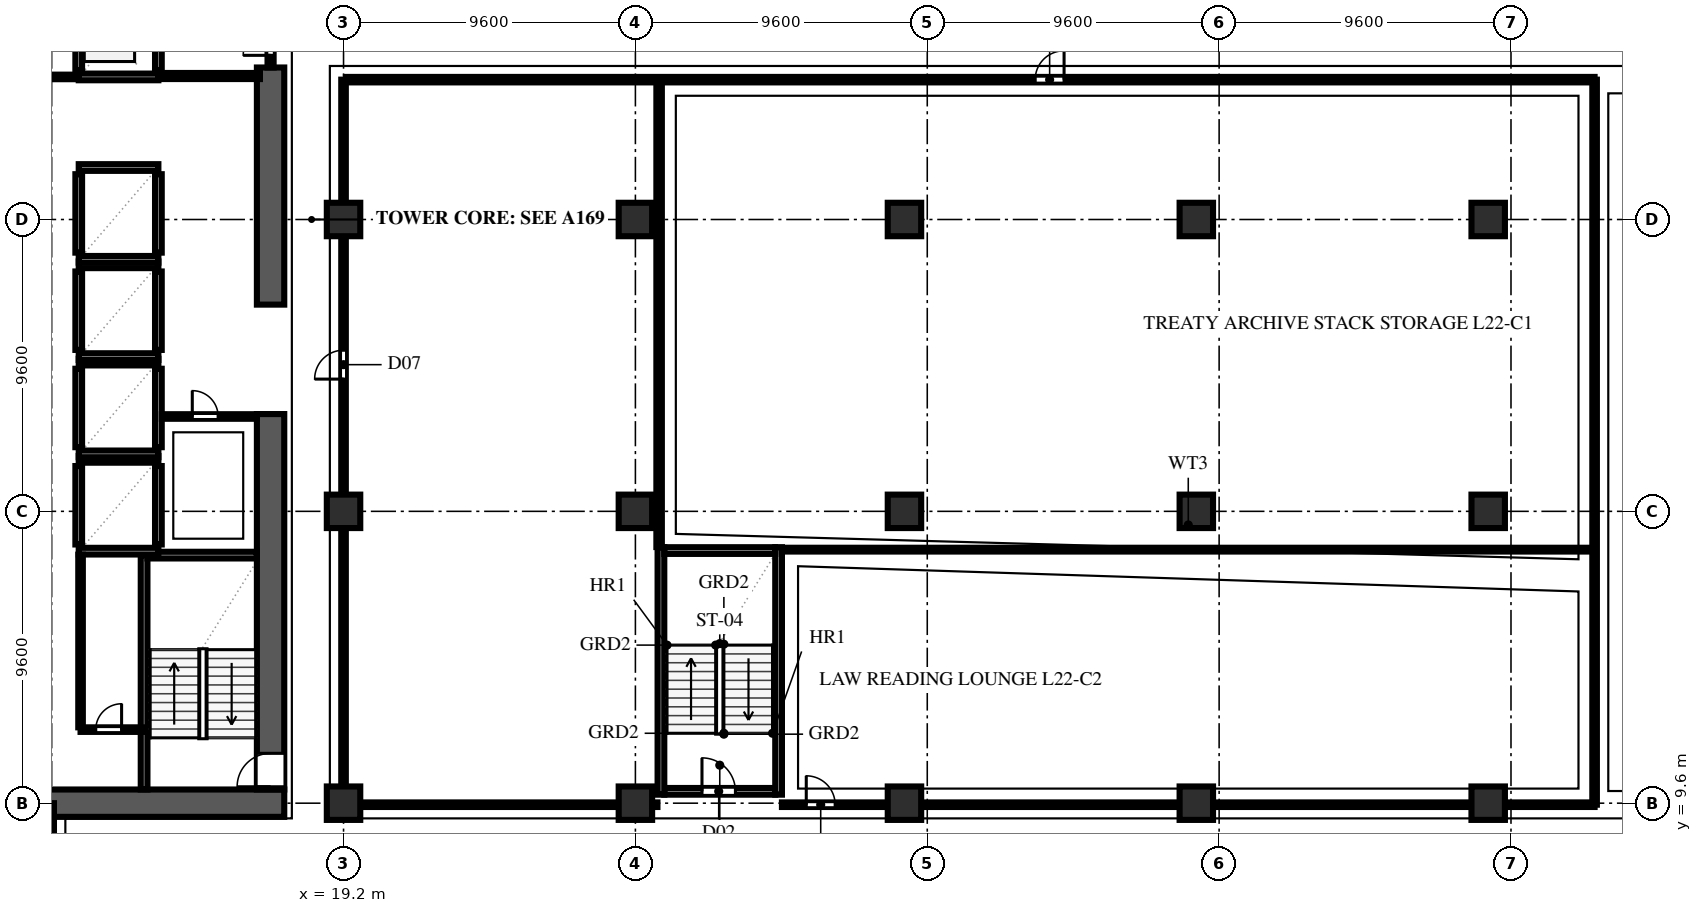
"""IFC4 building model, lengths in metres.
Left out: names, types, materials, properties, quantities, classifications, styles, units other than length and angle.
Written with IfcOpenShell. Run it as: python <this file> out.ifc"""

import sys

from ifc_helpers import new_model, si_unit, direction, frame, frame_2d, origin, origin_2d, place, context, subcontext, project, spatial, rectangle, extrude, element, fill, save


model = new_model("IFC4")
c1 = context("Model", 3, precision=1e-05, world=origin(), true_north=direction((0.0, 1.0)))
c2 = subcontext(c1, "Body", "Model", "MODEL_VIEW")
j1 = project(units=[si_unit("LENGTHUNIT", "METRE"), si_unit("PLANEANGLEUNIT", "RADIAN")], contexts=[c1])
p1 = place(None, origin())
s1 = spatial("IfcSite", under=j1, at=p1, CompositionType="ELEMENT")
p2 = place(p1, origin())
s2 = spatial("IfcBuilding", under=s1, at=p2, CompositionType="ELEMENT")
p3 = place(p2, frame((0.0, 0.0, 88.8)))
s3 = spatial("IfcBuildingStorey", under=s2, at=p3, CompositionType="ELEMENT", Elevation=88.8)
p4 = place(p3, frame((2.65, 9.6, 0.0), z_axis=(0.0, 0.0, 1.0), x_axis=(1.0, 0.0, 0.0)))
e1 = element("IfcWall", 1, at=p4, inside=s3, PredefinedType="SHEAR", context=c2, shape_type="SweptSolid", body=[
    extrude(rectangle(XDim=14.6, YDim=0.9, at=frame_2d((7.3, 0.0))), origin(), (0.0, 0.0, 1.0), 3.54),
])
p5 = place(p3, frame((16.8, 10.05, 0.0), z_axis=(0.0, 0.0, 1.0), x_axis=(0.0, 1.0, 0.0)))
e2 = element("IfcWall", 2, at=p5, inside=s3, PredefinedType="SHEAR", context=c2, shape_type="SweptSolid", body=[
    extrude(rectangle(XDim=12.35, YDim=0.9, at=frame_2d((6.175, 0.0))), origin(), (0.0, 0.0, 1.0), 3.54),
])
p6 = place(p5, frame((0.09, 0.0, 0.0)))
e3 = element("IfcOpeningElement", 3, at=p6, cuts=e2, PredefinedType="OPENING", context=c2, shape_type="SweptSolid", body=[
    extrude(rectangle(XDim=1.1, YDim=2.2, at=frame_2d((0.55, 1.1))), frame((0.0, 0.462, 0.0), z_axis=(0.0, -1.0, 0.0), x_axis=(1.0, 0.0, 0.0)), (0.0, 0.0, 1.0), 0.924),
])
p7 = place(p3, frame((16.8, 26.0, 0.0), z_axis=(0.0, 0.0, 1.0), x_axis=(0.0, 1.0, 0.0)))
e4 = element("IfcWall", 4, at=p7, inside=s3, PredefinedType="SHEAR", context=c2, shape_type="SweptSolid", body=[
    extrude(rectangle(XDim=7.8, YDim=0.9, at=frame_2d((3.9, 0.0))), origin(), (0.0, 0.0, 1.0), 3.54),
])
for number, where, z_axis, x_axis in (
    (5, (19.2, 9.6, 0.0), (0.0, 0.0, 1.0), (1.0, 0.0, 0.0)),
    (6, (19.2, 19.2, 0.0), (0.0, 0.0, 1.0), (1.0, 0.0, 0.0)),
    (7, (19.2, 28.8, 0.0), (0.0, 0.0, 1.0), (1.0, 0.0, 0.0)),
    (8, (28.8, 9.6, 0.0), (0.0, 0.0, 1.0), (1.0, 0.0, 0.0)),
    (9, (28.8, 19.2, 0.0), (0.0, 0.0, 1.0), (1.0, 0.0, 0.0)),
    (10, (28.8, 28.8, 0.0), (0.0, 0.0, 1.0), (1.0, 0.0, 0.0)),
    (11, (37.65, 9.6, 0.0), (0.0, 0.0, 1.0), (1.0, 0.0, 0.0)),
    (12, (37.65, 19.2, 0.0), (0.0, 0.0, 1.0), (1.0, 0.0, 0.0)),
    (13, (37.65, 28.8, 0.0), (0.0, 0.0, 1.0), (1.0, 0.0, 0.0)),
    (14, (47.25, 9.6, 0.0), (0.0, 0.0, 1.0), (1.0, 0.0, 0.0)),
    (15, (47.25, 19.2, 0.0), (0.0, 0.0, 1.0), (1.0, 0.0, 0.0)),
    (16, (47.25, 28.8, 0.0), (0.0, 0.0, 1.0), (1.0, 0.0, 0.0)),
    (17, (56.85, 9.6, 0.0), (0.0, 0.0, 1.0), (1.0, 0.0, 0.0)),
    (18, (56.85, 19.2, 0.0), (0.0, 0.0, 1.0), (1.0, 0.0, 0.0)),
    (19, (56.85, 28.8, 0.0), (0.0, 0.0, 1.0), (1.0, 0.0, 0.0)),
):
    element("IfcColumn", number, at=place(p3, frame(where, z_axis=z_axis, x_axis=x_axis)), inside=s3, PredefinedType="COLUMN", context=c2, shape_type="SweptSolid", body=[
        extrude(rectangle(XDim=1.1, YDim=1.1, at=origin_2d()), origin(), (0.0, 0.0, 1.0), 3.8),
    ])
p8 = place(p3, frame((12.64, 10.05, 0.0), z_axis=(0.0, 0.0, 1.0), x_axis=(0.0, 1.0, 0.0)))
e20 = element("IfcWall", 20, at=p8, inside=s3, PredefinedType="SOLIDWALL", context=c2, shape_type="SweptSolid", body=[
    extrude(rectangle(XDim=7.71, YDim=0.22, at=frame_2d((3.855, 0.0))), origin(), (0.0, 0.0, 1.0), 3.54),
])
p9 = place(p3, frame((12.75, 17.76, 0.0), z_axis=(0.0, 0.0, 1.0), x_axis=(1.0, 0.0, 0.0)))
e21 = element("IfcWall", 21, at=p9, inside=s3, PredefinedType="SOLIDWALL", context=c2, shape_type="SweptSolid", body=[
    extrude(rectangle(XDim=3.6, YDim=0.22, at=frame_2d((1.8, 0.0))), origin(), (0.0, 0.0, 1.0), 3.54),
])
p10 = place(p3, frame((29.75, 9.99, 0.0), z_axis=(0.0, 0.0, 1.0), x_axis=(1.0, 0.0, 0.0)))
e22 = element("IfcWall", 22, at=p10, inside=s3, PredefinedType="SOLIDWALL", context=c2, shape_type="SweptSolid", body=[
    extrude(rectangle(XDim=3.65, YDim=0.22, at=frame_2d((1.825, 0.0))), origin(), (0.0, 0.0, 1.0), 3.54),
])
p11 = place(p10, frame((1.24, 0.0, 0.0)))
e23 = element("IfcOpeningElement", 23, at=p11, cuts=e22, PredefinedType="OPENING", context=c2, shape_type="SweptSolid", body=[
    extrude(rectangle(XDim=1.1, YDim=2.2, at=frame_2d((0.55, 1.1))), frame((0.0, 0.122, 0.0), z_axis=(0.0, -1.0, 0.0), x_axis=(1.0, 0.0, 0.0)), (0.0, 0.0, 1.0), 0.244),
])
for number, where, z_axis, x_axis in (
    (24, (29.64, 9.88, 0.0), (0.0, 0.0, 1.0), (0.0, 1.0, 0.0)),
    (25, (33.51, 9.88, 0.0), (0.0, 0.0, 1.0), (0.0, 1.0, 0.0)),
):
    element("IfcWall", number, at=place(p3, frame(where, z_axis=z_axis, x_axis=x_axis)), inside=s3, PredefinedType="SOLIDWALL", context=c2, shape_type="SweptSolid", body=[
        extrude(rectangle(XDim=8.14, YDim=0.22, at=frame_2d((4.07, 0.0))), origin(), (0.0, 0.0, 1.0), 3.54),
    ])
p12 = place(p3, frame((29.75, 17.91, 0.0), z_axis=(0.0, 0.0, 1.0), x_axis=(1.0, 0.0, 0.0)))
e26 = element("IfcWall", 26, at=p12, inside=s3, PredefinedType="SOLIDWALL", context=c2, shape_type="SweptSolid", body=[
    extrude(rectangle(XDim=3.65, YDim=0.22, at=frame_2d((1.825, 0.0))), origin(), (0.0, 0.0, 1.0), 3.54),
])
for number, where, z_axis, x_axis in (
    (27, (10.49, 18.11, 0.0), (0.0, 0.0, 1.0), (0.0, 1.0, 0.0)),
    (28, (13.11, 18.11, 0.0), (0.0, 0.0, 1.0), (0.0, 1.0, 0.0)),
):
    element("IfcWall", number, at=place(p3, frame(where, z_axis=z_axis, x_axis=x_axis)), inside=s3, PredefinedType="SOLIDWALL", context=c2, shape_type="SweptSolid", body=[
        extrude(rectangle(XDim=2.58, YDim=0.22, at=frame_2d((1.29, 0.0))), origin(), (0.0, 0.0, 1.0), 3.54),
    ])
for number, where, z_axis, x_axis in (
    (29, (10.49, 17.89, 0.0), (0.0, 0.0, 1.0), (1.0, 0.0, 0.0)),
    (30, (10.49, 20.91, 0.0), (0.0, 0.0, 1.0), (1.0, 0.0, 0.0)),
):
    element("IfcWall", number, at=place(p3, frame(where, z_axis=z_axis, x_axis=x_axis)), inside=s3, PredefinedType="SOLIDWALL", context=c2, shape_type="SweptSolid", body=[
        extrude(rectangle(XDim=2.62, YDim=0.22, at=frame_2d((1.31, 0.0))), origin(), (0.0, 0.0, 1.0), 3.54),
    ])
for number, where, z_axis, x_axis in (
    (31, (10.49, 21.31, 0.0), (0.0, 0.0, 1.0), (0.0, 1.0, 0.0)),
    (32, (13.11, 21.31, 0.0), (0.0, 0.0, 1.0), (0.0, 1.0, 0.0)),
):
    element("IfcWall", number, at=place(p3, frame(where, z_axis=z_axis, x_axis=x_axis)), inside=s3, PredefinedType="SOLIDWALL", context=c2, shape_type="SweptSolid", body=[
        extrude(rectangle(XDim=2.58, YDim=0.22, at=frame_2d((1.29, 0.0))), origin(), (0.0, 0.0, 1.0), 3.54),
    ])
for number, where, z_axis, x_axis in (
    (33, (10.49, 21.09, 0.0), (0.0, 0.0, 1.0), (1.0, 0.0, 0.0)),
    (34, (10.49, 24.11, 0.0), (0.0, 0.0, 1.0), (1.0, 0.0, 0.0)),
):
    element("IfcWall", number, at=place(p3, frame(where, z_axis=z_axis, x_axis=x_axis)), inside=s3, PredefinedType="SOLIDWALL", context=c2, shape_type="SweptSolid", body=[
        extrude(rectangle(XDim=2.62, YDim=0.22, at=frame_2d((1.31, 0.0))), origin(), (0.0, 0.0, 1.0), 3.54),
    ])
for number, where, z_axis, x_axis in (
    (35, (10.49, 24.51, 0.0), (0.0, 0.0, 1.0), (0.0, 1.0, 0.0)),
    (36, (13.11, 24.51, 0.0), (0.0, 0.0, 1.0), (0.0, 1.0, 0.0)),
):
    element("IfcWall", number, at=place(p3, frame(where, z_axis=z_axis, x_axis=x_axis)), inside=s3, PredefinedType="SOLIDWALL", context=c2, shape_type="SweptSolid", body=[
        extrude(rectangle(XDim=2.58, YDim=0.22, at=frame_2d((1.29, 0.0))), origin(), (0.0, 0.0, 1.0), 3.54),
    ])
for number, where, z_axis, x_axis in (
    (37, (10.49, 24.29, 0.0), (0.0, 0.0, 1.0), (1.0, 0.0, 0.0)),
    (38, (10.49, 27.31, 0.0), (0.0, 0.0, 1.0), (1.0, 0.0, 0.0)),
):
    element("IfcWall", number, at=place(p3, frame(where, z_axis=z_axis, x_axis=x_axis)), inside=s3, PredefinedType="SOLIDWALL", context=c2, shape_type="SweptSolid", body=[
        extrude(rectangle(XDim=2.62, YDim=0.22, at=frame_2d((1.31, 0.0))), origin(), (0.0, 0.0, 1.0), 3.54),
    ])
for number, where, z_axis, x_axis in (
    (39, (10.49, 27.71, 0.0), (0.0, 0.0, 1.0), (0.0, 1.0, 0.0)),
    (40, (13.11, 27.71, 0.0), (0.0, 0.0, 1.0), (0.0, 1.0, 0.0)),
):
    element("IfcWall", number, at=place(p3, frame(where, z_axis=z_axis, x_axis=x_axis)), inside=s3, PredefinedType="SOLIDWALL", context=c2, shape_type="SweptSolid", body=[
        extrude(rectangle(XDim=2.58, YDim=0.22, at=frame_2d((1.29, 0.0))), origin(), (0.0, 0.0, 1.0), 3.54),
    ])
for number, where, z_axis, x_axis in (
    (41, (10.49, 27.49, 0.0), (0.0, 0.0, 1.0), (1.0, 0.0, 0.0)),
    (42, (10.49, 30.51, 0.0), (0.0, 0.0, 1.0), (1.0, 0.0, 0.0)),
):
    element("IfcWall", number, at=place(p3, frame(where, z_axis=z_axis, x_axis=x_axis)), inside=s3, PredefinedType="SOLIDWALL", context=c2, shape_type="SweptSolid", body=[
        extrude(rectangle(XDim=2.62, YDim=0.22, at=frame_2d((1.31, 0.0))), origin(), (0.0, 0.0, 1.0), 3.54),
    ])
for number, where, z_axis, x_axis in (
    (43, (10.49, 33.71, 0.0), (0.0, 0.0, 1.0), (0.0, 1.0, 0.0)),
    (44, (13.11, 33.71, 0.0), (0.0, 0.0, 1.0), (0.0, 1.0, 0.0)),
):
    element("IfcWall", number, at=place(p3, frame(where, z_axis=z_axis, x_axis=x_axis)), inside=s3, PredefinedType="SOLIDWALL", context=c2, shape_type="SweptSolid", body=[
        extrude(rectangle(XDim=2.78, YDim=0.22, at=frame_2d((1.39, 0.0))), origin(), (0.0, 0.0, 1.0), 3.54),
    ])
p13 = place(p3, frame((10.49, 33.49, 0.0), z_axis=(0.0, 0.0, 1.0), x_axis=(1.0, 0.0, 0.0)))
e45 = element("IfcWall", 45, at=p13, inside=s3, PredefinedType="SOLIDWALL", context=c2, shape_type="SweptSolid", body=[
    extrude(rectangle(XDim=2.62, YDim=0.22, at=frame_2d((1.31, 0.0))), origin(), (0.0, 0.0, 1.0), 3.54),
])
p14 = place(p3, frame((13.12, 33.52, 0.0), z_axis=(0.0, 0.0, 1.0), x_axis=(1.0, 0.0, 0.0)))
e46 = element("IfcWall", 46, at=p14, inside=s3, PredefinedType="SOLIDWALL", context=c2, shape_type="SweptSolid", body=[
    extrude(rectangle(XDim=3.33, YDim=0.2, at=frame_2d((1.665, 0.0))), origin(), (0.0, 0.0, 1.0), 3.54),
])
p15 = place(p3, frame((16.8, 33.8, 0.0), z_axis=(0.0, 0.0, 1.0), x_axis=(0.0, 1.0, 0.0)))
e47 = element("IfcWall", 47, at=p15, inside=s3, PredefinedType="SOLIDWALL", context=c2, shape_type="SweptSolid", body=[
    extrude(rectangle(XDim=2.6, YDim=0.2, at=frame_2d((1.3, 0.0))), origin(), (0.0, 0.0, 1.0), 3.54),
])
p16 = place(p15, frame((0.4, 0.0, 0.0)))
e48 = element("IfcOpeningElement", 48, at=p16, cuts=e47, PredefinedType="OPENING", context=c2, shape_type="SweptSolid", body=[
    extrude(rectangle(XDim=1.8, YDim=2.2, at=frame_2d((0.9, 1.1))), frame((0.0, 0.112, 0.0), z_axis=(0.0, -1.0, 0.0), x_axis=(1.0, 0.0, 0.0)), (0.0, 0.0, 1.0), 0.224),
])
p17 = place(p3, frame((8.965, 33.49, 0.0), z_axis=(0.0, 0.0, 1.0), x_axis=(1.0, 0.0, 0.0)))
e49 = element("IfcWall", 49, at=p17, inside=s3, PredefinedType="PARTITIONING", context=c2, shape_type="SweptSolid", body=[
    extrude(rectangle(XDim=1.52, YDim=0.15, at=frame_2d((0.76, 0.0))), origin(), (0.0, 0.0, 1.0), 3.54),
])
p18 = place(p3, frame((10.55, 12.02, 0.0), z_axis=(0.0, 0.0, 1.0), x_axis=(1.0, 0.0, 0.0)))
e50 = element("IfcWall", 50, at=p18, inside=s3, PredefinedType="PARTITIONING", context=c2, shape_type="SweptSolid", body=[
    extrude(rectangle(XDim=2.08, YDim=0.15, at=frame_2d((1.04, 0.0))), origin(), (0.0, 0.0, 1.0), 3.54),
])
p19 = place(p18, frame((0.5, 0.0, 0.0)))
e51 = element("IfcOpeningElement", 51, at=p19, cuts=e50, PredefinedType="OPENING", context=c2, shape_type="SweptSolid", body=[
    extrude(rectangle(XDim=0.85, YDim=2.1, at=frame_2d((0.425, 1.05))), frame((0.0, 0.087, 0.0), z_axis=(0.0, -1.0, 0.0), x_axis=(1.0, 0.0, 0.0)), (0.0, 0.0, 1.0), 0.174),
])
p20 = place(p3, frame((10.55, 12.095, 0.0), z_axis=(0.0, 0.0, 1.0), x_axis=(0.0, 1.0, 0.0)))
e52 = element("IfcWall", 52, at=p20, inside=s3, PredefinedType="PARTITIONING", context=c2, shape_type="SweptSolid", body=[
    extrude(rectangle(XDim=5.68, YDim=0.15, at=frame_2d((2.84, 0.0))), origin(), (0.0, 0.0, 1.0), 3.54),
])
p21 = place(p3, frame((13.225, 22.32, 0.0), z_axis=(0.0, 0.0, 1.0), x_axis=(1.0, 0.0, 0.0)))
e53 = element("IfcWall", 53, at=p21, inside=s3, PredefinedType="PARTITIONING", context=c2, shape_type="SweptSolid", body=[
    extrude(rectangle(XDim=3.12, YDim=0.15, at=frame_2d((1.56, 0.0))), origin(), (0.0, 0.0, 1.0), 3.54),
])
p22 = place(p21, frame((1.0, 0.0, 0.0)))
e54 = element("IfcOpeningElement", 54, at=p22, cuts=e53, PredefinedType="OPENING", context=c2, shape_type="SweptSolid", body=[
    extrude(rectangle(XDim=0.85, YDim=2.1, at=frame_2d((0.425, 1.05))), frame((0.0, 0.087, 0.0), z_axis=(0.0, -1.0, 0.0), x_axis=(1.0, 0.0, 0.0)), (0.0, 0.0, 1.0), 0.174),
])
p23 = place(p3, frame((9.6, 7.5, 0.0), z_axis=(0.0, 0.0, 1.0), x_axis=(0.0, 1.0, 0.0)))
e55 = element("IfcWall", 55, at=p23, inside=s3, PredefinedType="PARTITIONING", context=c2, shape_type="SweptSolid", body=[
    extrude(rectangle(XDim=2.1, YDim=0.15, at=frame_2d((1.05, 0.0))), origin(), (0.0, 0.0, 1.0), 2.924),
])
p24 = place(p3, frame((19.2, 9.55, 0.0), z_axis=(0.0, 0.0, 1.0), x_axis=(0.0, 1.0, 0.0)))
e56 = element("IfcWall", 56, at=p24, inside=s3, PredefinedType="PARTITIONING", context=c2, shape_type="SweptSolid", body=[
    extrude(rectangle(XDim=23.85, YDim=0.15, at=frame_2d((11.925, 0.0))), origin(), (0.0, 0.0, 1.0), 2.924),
])
p25 = place(p24, frame((14.0, 0.0, 0.0)))
e57 = element("IfcOpeningElement", 57, at=p25, cuts=e56, PredefinedType="OPENING", context=c2, shape_type="SweptSolid", body=[
    extrude(rectangle(XDim=0.95, YDim=2.15, at=frame_2d((0.475, 1.075))), frame((0.0, 0.087, 0.0), z_axis=(0.0, -1.0, 0.0), x_axis=(1.0, 0.0, 0.0)), (0.0, 0.0, 1.0), 0.174),
])
p26 = place(p3, frame((29.58, 18.025, 0.0), z_axis=(0.0, 0.0, 1.0), x_axis=(0.0, 1.0, 0.0)))
e58 = element("IfcWall", 58, at=p26, inside=s3, PredefinedType="PARTITIONING", context=c2, shape_type="SweptSolid", body=[
    extrude(rectangle(XDim=15.28, YDim=0.18, at=frame_2d((7.64, 0.0))), origin(), (0.0, 0.0, 1.0), 3.54),
])
p27 = place(p3, frame((19.28, 33.4, 0.0), z_axis=(0.0, 0.0, 1.0), x_axis=(1.0, 0.0, 0.0)))
e59 = element("IfcWall", 59, at=p27, inside=s3, PredefinedType="PARTITIONING", context=c2, shape_type="SweptSolid", body=[
    extrude(rectangle(XDim=41.07, YDim=0.18, at=frame_2d((20.535, 0.0))), origin(), (0.0, 0.0, 1.0), 3.54),
])
p28 = place(p27, frame((22.67, 0.0, 0.0)))
e60 = element("IfcOpeningElement", 60, at=p28, cuts=e59, PredefinedType="OPENING", context=c2, shape_type="SweptSolid", body=[
    extrude(rectangle(XDim=0.95, YDim=2.15, at=frame_2d((0.475, 1.075))), frame((0.0, 0.102, 0.0), z_axis=(0.0, -1.0, 0.0), x_axis=(1.0, 0.0, 0.0)), (0.0, 0.0, 1.0), 0.204),
])
p29 = place(p3, frame((19.28, 9.55, 0.0), z_axis=(0.0, 0.0, 1.0), x_axis=(1.0, 0.0, 0.0)))
e61 = element("IfcWall", 61, at=p29, inside=s3, PredefinedType="PARTITIONING", context=c2, shape_type="SweptSolid", body=[
    extrude(rectangle(XDim=10.245, YDim=0.15, at=frame_2d((5.123, 0.0))), origin(), (0.0, 0.0, 1.0), 2.924),
])
p30 = place(p3, frame((33.62, 17.94, 0.0), z_axis=(0.0, 0.0, 1.0), x_axis=(1.0, 0.0, 0.0)))
e62 = element("IfcWall", 62, at=p30, inside=s3, PredefinedType="PARTITIONING", context=c2, shape_type="SweptSolid", body=[
    extrude(rectangle(XDim=26.73, YDim=0.125, at=frame_2d((13.365, 0.0))), origin(), (0.0, 0.0, 1.0), 3.54),
])
p31 = place(p3, frame((33.62, 9.55, 0.0), z_axis=(0.0, 0.0, 1.0), x_axis=(1.0, 0.0, 0.0)))
e63 = element("IfcWall", 63, at=p31, inside=s3, PredefinedType="PARTITIONING", context=c2, shape_type="SweptSolid", body=[
    extrude(rectangle(XDim=26.73, YDim=0.15, at=frame_2d((13.365, 0.0))), origin(), (0.0, 0.0, 1.0), 2.924),
])
p32 = place(p31, frame((0.8, 0.0, 0.0)))
e64 = element("IfcOpeningElement", 64, at=p32, cuts=e63, PredefinedType="OPENING", context=c2, shape_type="SweptSolid", body=[
    extrude(rectangle(XDim=0.95, YDim=2.15, at=frame_2d((0.475, 1.075))), frame((0.0, 0.087, 0.0), z_axis=(0.0, -1.0, 0.0), x_axis=(1.0, 0.0, 0.0)), (0.0, 0.0, 1.0), 0.174),
])
p33 = place(p3, frame((60.35, 9.55, 0.0), z_axis=(0.0, 0.0, 1.0), x_axis=(0.0, 1.0, 0.0)))
e65 = element("IfcWall", 65, at=p33, inside=s3, PredefinedType="PARTITIONING", context=c2, shape_type="SweptSolid", body=[
    extrude(rectangle(XDim=23.85, YDim=0.15, at=frame_2d((11.925, 0.0))), origin(), (0.0, 0.0, 1.0), 3.54),
])
p34 = place(p6, origin())
e66 = element("IfcDoor", 66, at=p34, inside=s3, OperationType="SINGLE_SWING_LEFT", PredefinedType="DOOR", context=c2, shape_type="SweptSolid", body=[
    extrude(rectangle(XDim=1.1, YDim=2.2, at=frame_2d((0.55, 1.1))), frame((0.0, 0.025, 0.0), z_axis=(0.0, -1.0, 0.0), x_axis=(1.0, 0.0, 0.0)), (0.0, 0.0, 1.0), 0.05),
])
fill(e3, e66)
p35 = place(p11, origin())
e67 = element("IfcDoor", 67, at=p35, inside=s3, OperationType="SINGLE_SWING_LEFT", PredefinedType="DOOR", context=c2, shape_type="SweptSolid", body=[
    extrude(rectangle(XDim=1.1, YDim=2.2, at=frame_2d((0.55, 1.1))), frame((0.0, 0.025, 0.0), z_axis=(0.0, -1.0, 0.0), x_axis=(1.0, 0.0, 0.0)), (0.0, 0.0, 1.0), 0.05),
])
fill(e23, e67)
p36 = place(p16, origin())
e68 = element("IfcDoor", 68, at=p36, inside=s3, OperationType="DOUBLE_DOOR_SINGLE_SWING", PredefinedType="DOOR", context=c2, shape_type="SweptSolid", body=[
    extrude(rectangle(XDim=1.8, YDim=2.2, at=frame_2d((0.9, 1.1))), frame((0.0, 0.025, 0.0), z_axis=(0.0, -1.0, 0.0), x_axis=(1.0, 0.0, 0.0)), (0.0, 0.0, 1.0), 0.05),
])
fill(e48, e68)
p37 = place(p19, origin())
e69 = element("IfcDoor", 69, at=p37, inside=s3, OperationType="SINGLE_SWING_RIGHT", PredefinedType="DOOR", context=c2, shape_type="SweptSolid", body=[
    extrude(rectangle(XDim=0.85, YDim=2.1, at=frame_2d((0.425, 1.05))), frame((0.0, 0.025, 0.0), z_axis=(0.0, -1.0, 0.0), x_axis=(1.0, 0.0, 0.0)), (0.0, 0.0, 1.0), 0.05),
])
fill(e51, e69)
p38 = place(p22, origin())
e70 = element("IfcDoor", 70, at=p38, inside=s3, OperationType="SINGLE_SWING_LEFT", PredefinedType="DOOR", context=c2, shape_type="SweptSolid", body=[
    extrude(rectangle(XDim=0.85, YDim=2.1, at=frame_2d((0.425, 1.05))), frame((0.0, 0.025, 0.0), z_axis=(0.0, -1.0, 0.0), x_axis=(1.0, 0.0, 0.0)), (0.0, 0.0, 1.0), 0.05),
])
fill(e54, e70)
p39 = place(p25, origin())
e71 = element("IfcDoor", 71, at=p39, inside=s3, OperationType="SINGLE_SWING_LEFT", PredefinedType="DOOR", context=c2, shape_type="SweptSolid", body=[
    extrude(rectangle(XDim=0.95, YDim=2.15, at=frame_2d((0.475, 1.075))), frame((0.0, 0.025, 0.0), z_axis=(0.0, -1.0, 0.0), x_axis=(1.0, 0.0, 0.0)), (0.0, 0.0, 1.0), 0.05),
])
fill(e57, e71)
p40 = place(p28, origin())
e72 = element("IfcDoor", 72, at=p40, inside=s3, OperationType="SINGLE_SWING_RIGHT", PredefinedType="DOOR", context=c2, shape_type="SweptSolid", body=[
    extrude(rectangle(XDim=0.95, YDim=2.15, at=frame_2d((0.475, 1.075))), frame((0.0, 0.025, 0.0), z_axis=(0.0, -1.0, 0.0), x_axis=(1.0, 0.0, 0.0)), (0.0, 0.0, 1.0), 0.05),
])
fill(e60, e72)
p41 = place(p32, origin())
e73 = element("IfcDoor", 73, at=p41, inside=s3, OperationType="SINGLE_SWING_LEFT", PredefinedType="DOOR", context=c2, shape_type="SweptSolid", body=[
    extrude(rectangle(XDim=0.95, YDim=2.15, at=frame_2d((0.475, 1.075))), frame((0.0, 0.025, 0.0), z_axis=(0.0, -1.0, 0.0), x_axis=(1.0, 0.0, 0.0)), (0.0, 0.0, 1.0), 0.05),
])
fill(e64, e73)
save(model, sys.argv[1])
